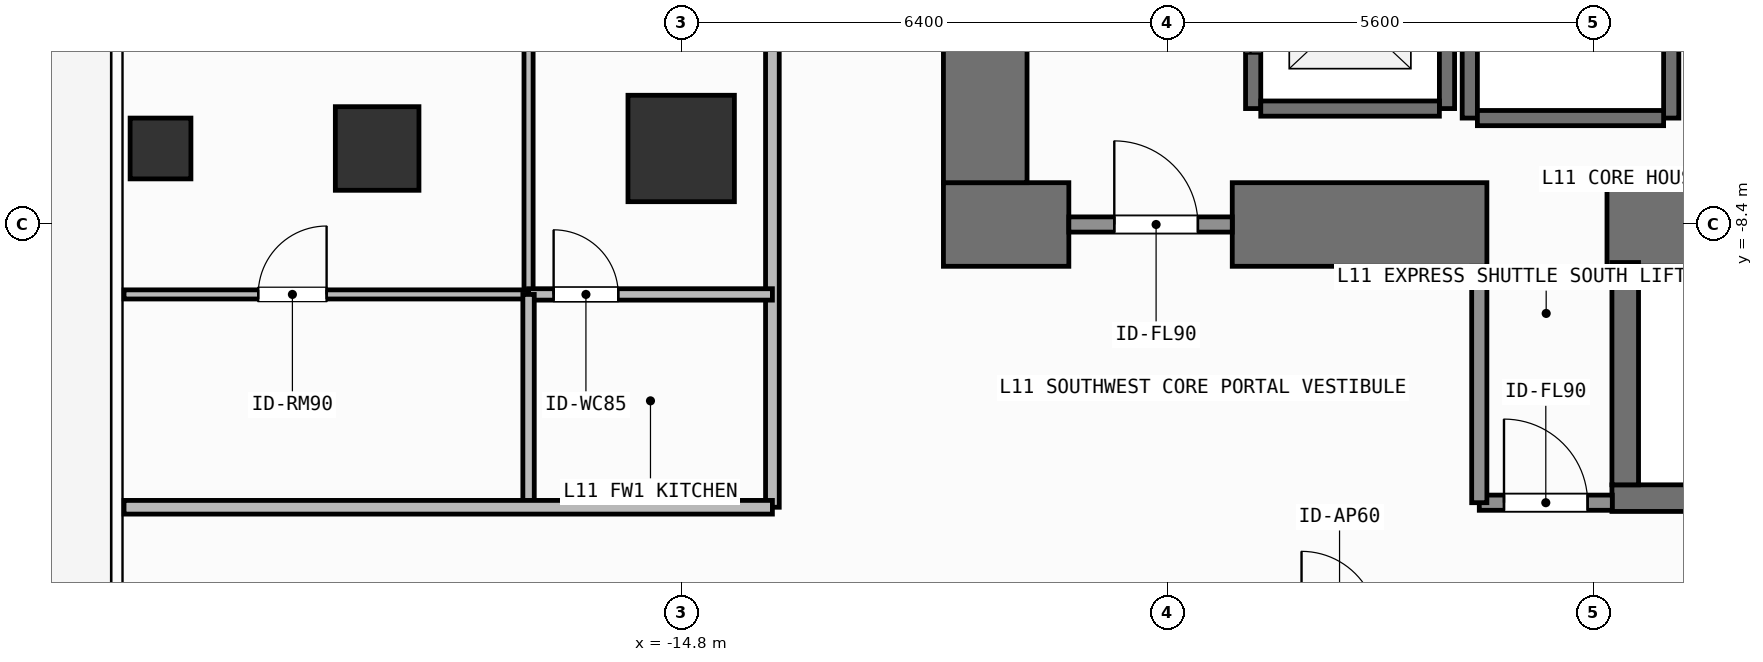
"""IFC4 building model, lengths in metres.
Left out: names, types, materials, properties, quantities, classifications, styles, units other than length and angle.
Written with IfcOpenShell. Run it as: python <this file> out.ifc"""

import sys

from ifc_helpers import new_model, si_unit, direction, frame, frame_2d, origin, origin_2d, place, context, subcontext, project, spatial, rectangle, hollow_rectangle, extrude, element, fill, save


model = new_model("IFC4")
c1 = context("Model", 3, precision=1e-05, world=origin(), true_north=direction((0.0, 1.0)))
c2 = subcontext(c1, "Body", "Model", "MODEL_VIEW")
j1 = project(units=[si_unit("LENGTHUNIT", "METRE"), si_unit("PLANEANGLEUNIT", "RADIAN")], contexts=[c1])
p1 = place(None, origin())
s1 = spatial("IfcSite", under=j1, at=p1, CompositionType="ELEMENT")
p2 = place(p1, origin())
s2 = spatial("IfcBuilding", under=s1, at=p2, CompositionType="ELEMENT")
p3 = place(p2, frame((0.0, 0.0, 42.3)))
s3 = spatial("IfcBuildingStorey", under=s2, at=p3, CompositionType="ELEMENT", Elevation=42.3)
p4 = place(p3, frame((-11.35, -8.4, 0.0), z_axis=(0.0, 0.0, 1.0), x_axis=(1.0, 0.0, 0.0)))
e1 = element("IfcWall", 1, at=p4, inside=s3, PredefinedType="SHEAR", context=c2, shape_type="SweptSolid", body=[
    extrude(rectangle(XDim=1.65, YDim=1.1, at=frame_2d((0.825, 0.0))), origin(), (0.0, 0.0, 1.0), 3.9),
])
p5 = place(p3, frame((-7.55, -8.4, 0.0), z_axis=(0.0, 0.0, 1.0), x_axis=(1.0, 0.0, 0.0)))
e2 = element("IfcWall", 2, at=p5, inside=s3, PredefinedType="SHEAR", context=c2, shape_type="SweptSolid", body=[
    extrude(rectangle(XDim=3.35, YDim=1.1, at=frame_2d((1.675, 0.0))), origin(), (0.0, 0.0, 1.0), 3.9),
])
p6 = place(p3, frame((-2.62, -8.4, 0.0), z_axis=(0.0, 0.0, 1.0), x_axis=(1.0, 0.0, 0.0)))
e3 = element("IfcWall", 3, at=p6, inside=s3, PredefinedType="SHEAR", context=c2, shape_type="SweptSolid", body=[
    extrude(rectangle(XDim=7.27, YDim=1.1, at=frame_2d((3.635, 0.0))), origin(), (0.0, 0.0, 1.0), 3.9),
])
p7 = place(p3, frame((-10.8, -7.85, 0.0), z_axis=(0.0, 0.0, 1.0), x_axis=(0.0, 1.0, 0.0)))
e4 = element("IfcWall", 4, at=p7, inside=s3, PredefinedType="SHEAR", context=c2, shape_type="SweptSolid", body=[
    extrude(rectangle(XDim=15.7, YDim=1.1, at=frame_2d((7.85, 0.0))), origin(), (0.0, 0.0, 1.0), 3.9),
])
p8 = place(p3, frame((-2.555, -12.0, 0.0), z_axis=(0.0, 0.0, 1.0), x_axis=(1.0, 0.0, 0.0)))
e5 = element("IfcWall", 5, at=p8, inside=s3, PredefinedType="SHEAR", context=c2, shape_type="SweptSolid", body=[
    extrude(rectangle(XDim=7.31, YDim=0.35, at=frame_2d((3.655, 0.0))), origin(), (0.0, 0.0, 1.0), 3.9),
])
p9 = place(p3, frame((-2.2, -8.988, 0.0), z_axis=(0.0, 0.0, 1.0), x_axis=(1.0, 0.0, 0.0)))
e6 = element("IfcWall", 6, at=p9, inside=s3, PredefinedType="SHEAR", context=c2, shape_type="SweptSolid", body=[
    extrude(rectangle(XDim=6.6, YDim=0.075, at=frame_2d((3.3, 0.0))), origin(), (0.0, 0.0, 1.0), 3.9),
])
p10 = place(p3, frame((-2.38, -11.825, 0.0), z_axis=(0.0, 0.0, 1.0), x_axis=(0.0, 1.0, 0.0)))
e7 = element("IfcWall", 7, at=p10, inside=s3, PredefinedType="SHEAR", context=c2, shape_type="SweptSolid", body=[
    extrude(rectangle(XDim=2.925, YDim=0.35, at=frame_2d((1.462, 0.0))), origin(), (0.0, 0.0, 1.0), 3.9),
])
p11 = place(p3, frame((-14.8, -7.4, 0.0), z_axis=(0.0, 0.0, 1.0), x_axis=(1.0, 0.0, 0.0)))
e8 = element("IfcColumn", 8, at=p11, inside=s3, PredefinedType="COLUMN", context=c2, shape_type="SweptSolid", body=[
    extrude(rectangle(XDim=1.4, YDim=1.4, at=origin_2d()), origin(), (0.0, 0.0, 1.0), 3.9),
])
p12 = place(p3, frame((-18.8, -7.4, 0.0), z_axis=(0.0, 0.0, 1.0), x_axis=(1.0, 0.0, 0.0)))
e9 = element("IfcColumn", 9, at=p12, inside=s3, PredefinedType="COLUMN", context=c2, shape_type="SweptSolid", body=[
    extrude(rectangle(XDim=1.1, YDim=1.1, at=origin_2d()), origin(), (0.0, 0.0, 1.0), 3.9),
])
p13 = place(p3, frame((-21.65, -7.4, 0.0), z_axis=(0.0, 0.0, 1.0), x_axis=(1.0, 0.0, 0.0)))
e10 = element("IfcColumn", 10, at=p13, inside=s3, PredefinedType="COLUMN", context=c2, shape_type="SweptSolid", body=[
    extrude(hollow_rectangle(XDim=0.8, YDim=0.8, WallThickness=0.036, at=origin_2d()), origin(), (0.0, 0.0, 1.0), 3.9),
])
p14 = place(p3, frame((-7.275, -6.875, 0.0), z_axis=(0.0, 0.0, 1.0), x_axis=(0.0, 1.0, 0.0)))
e11 = element("IfcWall", 11, at=p14, inside=s3, PredefinedType="SHEAR", context=c2, shape_type="SweptSolid", body=[
    extrude(rectangle(XDim=2.55, YDim=0.2, at=frame_2d((1.275, 0.0))), origin(), (0.0, 0.0, 1.0), 3.68),
])
p15 = place(p14, frame((0.725, 0.0, 0.0)))
e12 = element("IfcOpeningElement", 12, at=p15, cuts=e11, PredefinedType="OPENING", context=c2, shape_type="SweptSolid", body=[
    extrude(rectangle(XDim=1.1, YDim=2.2, at=frame_2d((0.55, 1.1))), frame((0.0, 0.11, 0.0), z_axis=(0.0, -1.0, 0.0), x_axis=(1.0, 0.0, 0.0)), (0.0, 0.0, 1.0), 0.22),
])
p16 = place(p3, frame((-4.725, -6.875, 0.0), z_axis=(0.0, 0.0, 1.0), x_axis=(0.0, 1.0, 0.0)))
e13 = element("IfcWall", 13, at=p16, inside=s3, PredefinedType="SHEAR", context=c2, shape_type="SweptSolid", body=[
    extrude(rectangle(XDim=2.55, YDim=0.2, at=frame_2d((1.275, 0.0))), origin(), (0.0, 0.0, 1.0), 3.68),
])
p17 = place(p3, frame((-7.175, -6.875, 0.0), z_axis=(0.0, 0.0, 1.0), x_axis=(1.0, 0.0, 0.0)))
e14 = element("IfcWall", 14, at=p17, inside=s3, PredefinedType="SHEAR", context=c2, shape_type="SweptSolid", body=[
    extrude(rectangle(XDim=2.35, YDim=0.2, at=frame_2d((1.175, 0.0))), origin(), (0.0, 0.0, 1.0), 3.68),
])
for number, where, z_axis, x_axis in (
    (15, (-4.425, -7.0, 0.0), (0.0, 0.0, 1.0), (0.0, 1.0, 0.0)),
    (16, (-1.775, -7.0, 0.0), (0.0, 0.0, 1.0), (0.0, 1.0, 0.0)),
):
    element("IfcWall", number, at=place(p3, frame(where, z_axis=z_axis, x_axis=x_axis)), inside=s3, PredefinedType="SHEAR", context=c2, shape_type="SweptSolid", body=[
        extrude(rectangle(XDim=2.8, YDim=0.2, at=frame_2d((1.4, 0.0))), origin(), (0.0, 0.0, 1.0), 3.68),
    ])
p18 = place(p3, frame((-4.325, -7.0, 0.0), z_axis=(0.0, 0.0, 1.0), x_axis=(1.0, 0.0, 0.0)))
e17 = element("IfcWall", 17, at=p18, inside=s3, PredefinedType="SHEAR", context=c2, shape_type="SweptSolid", body=[
    extrude(rectangle(XDim=2.45, YDim=0.2, at=frame_2d((1.225, 0.0))), origin(), (0.0, 0.0, 1.0), 3.68),
])
p19 = place(p3, frame((-9.7, -8.4, 0.0), z_axis=(0.0, 0.0, 1.0), x_axis=(1.0, 0.0, 0.0)))
e18 = element("IfcWall", 18, at=p19, inside=s3, PredefinedType="SOLIDWALL", context=c2, shape_type="SweptSolid", body=[
    extrude(rectangle(XDim=2.15, YDim=0.2, at=frame_2d((1.075, 0.0))), origin(), (0.0, 0.0, 1.0), 2.72),
])
p20 = place(p19, frame((0.598, 0.0, 0.0)))
e19 = element("IfcOpeningElement", 19, at=p20, cuts=e18, PredefinedType="OPENING", context=c2, shape_type="SweptSolid", body=[
    extrude(rectangle(XDim=1.1, YDim=2.15, at=frame_2d((0.55, 1.075))), frame((0.0, 0.11, 0.0), z_axis=(0.0, -1.0, 0.0), x_axis=(1.0, 0.0, 0.0)), (0.0, 0.0, 1.0), 0.22),
])
p21 = place(p3, frame((-4.3, -12.06, 0.0), z_axis=(0.0, 0.0, 1.0), x_axis=(1.0, 0.0, 0.0)))
e20 = element("IfcWall", 20, at=p21, inside=s3, PredefinedType="SOLIDWALL", context=c2, shape_type="SweptSolid", body=[
    extrude(rectangle(XDim=1.75, YDim=0.2, at=frame_2d((0.875, 0.0))), origin(), (0.0, 0.0, 1.0), 3.68),
])
p22 = place(p21, frame((0.325, 0.0, 0.0)))
e21 = element("IfcOpeningElement", 21, at=p22, cuts=e20, PredefinedType="OPENING", context=c2, shape_type="SweptSolid", body=[
    extrude(rectangle(XDim=1.1, YDim=2.15, at=frame_2d((0.55, 1.075))), frame((0.0, 0.11, 0.0), z_axis=(0.0, -1.0, 0.0), x_axis=(1.0, 0.0, 0.0)), (0.0, 0.0, 1.0), 0.22),
])
p23 = place(p3, frame((-13.6, -12.12, 0.0), z_axis=(0.0, 0.0, 1.0), x_axis=(0.0, 1.0, 0.0)))
e22 = element("IfcWall", 22, at=p23, inside=s3, PredefinedType="PARTITIONING", context=c2, shape_type="SweptSolid", body=[
    extrude(rectangle(XDim=24.24, YDim=0.18, at=frame_2d((12.12, 0.0))), origin(), (0.0, 0.0, 1.0), 3.68),
])
p24 = place(p23, frame((9.829, 0.0, 0.0)))
e23 = element("IfcOpeningElement", 23, at=p24, cuts=e22, PredefinedType="OPENING", context=c2, shape_type="SweptSolid", body=[
    extrude(rectangle(XDim=1.0, YDim=2.2, at=frame_2d((0.5, 1.1))), frame((0.0, 0.1, 0.0), z_axis=(0.0, -1.0, 0.0), x_axis=(1.0, 0.0, 0.0)), (0.0, 0.0, 1.0), 0.2),
])
p25 = place(p3, frame((-16.808, -9.32, 0.0), z_axis=(0.0, 0.0, 1.0), x_axis=(0.0, 1.0, 0.0)))
e24 = element("IfcWall", 24, at=p25, inside=s3, PredefinedType="PARTITIONING", context=c2, shape_type="SweptSolid", body=[
    extrude(rectangle(XDim=14.756, YDim=0.12, at=frame_2d((7.378, 0.0))), origin(), (0.0, 0.0, 1.0), 3.68),
])
p26 = place(p25, frame((6.928, 0.0, 0.0)))
e25 = element("IfcOpeningElement", 25, at=p26, cuts=e24, PredefinedType="OPENING", context=c2, shape_type="SweptSolid", body=[
    extrude(rectangle(XDim=0.9, YDim=2.1, at=frame_2d((0.45, 1.05))), frame((0.0, 0.07, 0.0), z_axis=(0.0, -1.0, 0.0), x_axis=(1.0, 0.0, 0.0)), (0.0, 0.0, 1.0), 0.14),
])
p27 = place(p3, frame((-16.808, -9.32, 0.0), z_axis=(0.0, 0.0, 1.0), x_axis=(1.0, 0.0, 0.0)))
e26 = element("IfcWall", 26, at=p27, inside=s3, PredefinedType="PARTITIONING", context=c2, shape_type="SweptSolid", body=[
    extrude(rectangle(XDim=3.208, YDim=0.15, at=frame_2d((1.604, 0.0))), origin(), (0.0, 0.0, 1.0), 3.68),
])
p28 = place(p27, frame((0.33, 0.0, 0.0)))
e27 = element("IfcOpeningElement", 27, at=p28, cuts=e26, PredefinedType="OPENING", context=c2, shape_type="SweptSolid", body=[
    extrude(rectangle(XDim=0.85, YDim=2.1, at=frame_2d((0.425, 1.05))), frame((0.0, 0.085, 0.0), z_axis=(0.0, -1.0, 0.0), x_axis=(1.0, 0.0, 0.0)), (0.0, 0.0, 1.0), 0.17),
])
p29 = place(p3, frame((-22.13, -9.32, 0.0), z_axis=(0.0, 0.0, 1.0), x_axis=(1.0, 0.0, 0.0)))
e28 = element("IfcWall", 28, at=p29, inside=s3, PredefinedType="PARTITIONING", context=c2, shape_type="SweptSolid", body=[
    extrude(rectangle(XDim=5.322, YDim=0.12, at=frame_2d((2.661, 0.0))), origin(), (0.0, 0.0, 1.0), 3.68),
])
p30 = place(p29, frame((1.765, 0.0, 0.0)))
e29 = element("IfcOpeningElement", 29, at=p30, cuts=e28, PredefinedType="OPENING", context=c2, shape_type="SweptSolid", body=[
    extrude(rectangle(XDim=0.9, YDim=2.1, at=frame_2d((0.45, 1.05))), frame((0.0, 0.07, 0.0), z_axis=(0.0, -1.0, 0.0), x_axis=(1.0, 0.0, 0.0)), (0.0, 0.0, 1.0), 0.14),
])
p31 = place(p3, frame((-4.3, -12.06, 0.0), z_axis=(0.0, 0.0, 1.0), x_axis=(0.0, 1.0, 0.0)))
e30 = element("IfcWall", 30, at=p31, inside=s3, PredefinedType="SOLIDWALL", context=c2, shape_type="SweptSolid", body=[
    extrude(rectangle(XDim=3.11, YDim=0.2, at=frame_2d((1.555, 0.0))), origin(), (0.0, 0.0, 1.0), 3.68),
])
p32 = place(p3, frame((-16.808, -12.12, 0.0), z_axis=(0.0, 0.0, 1.0), x_axis=(0.0, 1.0, 0.0)))
e31 = element("IfcWall", 31, at=p32, inside=s3, PredefinedType="PARTITIONING", context=c2, shape_type="SweptSolid", body=[
    extrude(rectangle(XDim=2.8, YDim=0.15, at=frame_2d((1.4, 0.0))), origin(), (0.0, 0.0, 1.0), 3.68),
])
p33 = place(p3, frame((-22.13, -12.12, 0.0), z_axis=(0.0, 0.0, 1.0), x_axis=(1.0, 0.0, 0.0)))
e32 = element("IfcWall", 32, at=p33, inside=s3, PredefinedType="PARTITIONING", context=c2, shape_type="SweptSolid", body=[
    extrude(rectangle(XDim=8.53, YDim=0.18, at=frame_2d((4.265, 0.0))), origin(), (0.0, 0.0, 1.0), 3.68),
])
p34 = place(p15, origin())
e33 = element("IfcDoor", 33, at=p34, inside=s3, OperationType="SLIDING_TO_LEFT", PredefinedType="DOOR", context=c2, shape_type="SweptSolid", body=[
    extrude(rectangle(XDim=1.1, YDim=2.2, at=frame_2d((0.55, 1.1))), frame((0.0, 0.025, 0.0), z_axis=(0.0, -1.0, 0.0), x_axis=(1.0, 0.0, 0.0)), (0.0, 0.0, 1.0), 0.05),
])
fill(e12, e33)
p35 = place(p20, origin())
e34 = element("IfcDoor", 34, at=p35, inside=s3, OperationType="SINGLE_SWING_LEFT", PredefinedType="DOOR", context=c2, shape_type="SweptSolid", body=[
    extrude(rectangle(XDim=1.1, YDim=2.15, at=frame_2d((0.55, 1.075))), frame((0.0, 0.025, 0.0), z_axis=(0.0, -1.0, 0.0), x_axis=(1.0, 0.0, 0.0)), (0.0, 0.0, 1.0), 0.05),
])
fill(e19, e34)
p36 = place(p22, origin())
e35 = element("IfcDoor", 35, at=p36, inside=s3, OperationType="SINGLE_SWING_LEFT", PredefinedType="DOOR", context=c2, shape_type="SweptSolid", body=[
    extrude(rectangle(XDim=1.1, YDim=2.15, at=frame_2d((0.55, 1.075))), frame((0.0, 0.025, 0.0), z_axis=(0.0, -1.0, 0.0), x_axis=(1.0, 0.0, 0.0)), (0.0, 0.0, 1.0), 0.05),
])
fill(e21, e35)
p37 = place(p28, origin())
e36 = element("IfcDoor", 36, at=p37, inside=s3, OperationType="SINGLE_SWING_LEFT", PredefinedType="DOOR", context=c2, shape_type="SweptSolid", body=[
    extrude(rectangle(XDim=0.85, YDim=2.1, at=frame_2d((0.425, 1.05))), frame((0.0, 0.025, 0.0), z_axis=(0.0, -1.0, 0.0), x_axis=(1.0, 0.0, 0.0)), (0.0, 0.0, 1.0), 0.05),
])
fill(e27, e36)
p38 = place(p30, origin())
e37 = element("IfcDoor", 37, at=p38, inside=s3, OperationType="SINGLE_SWING_RIGHT", PredefinedType="DOOR", context=c2, shape_type="SweptSolid", body=[
    extrude(rectangle(XDim=0.9, YDim=2.1, at=frame_2d((0.45, 1.05))), frame((0.0, 0.025, 0.0), z_axis=(0.0, -1.0, 0.0), x_axis=(1.0, 0.0, 0.0)), (0.0, 0.0, 1.0), 0.05),
])
fill(e29, e37)
save(model, sys.argv[1])
